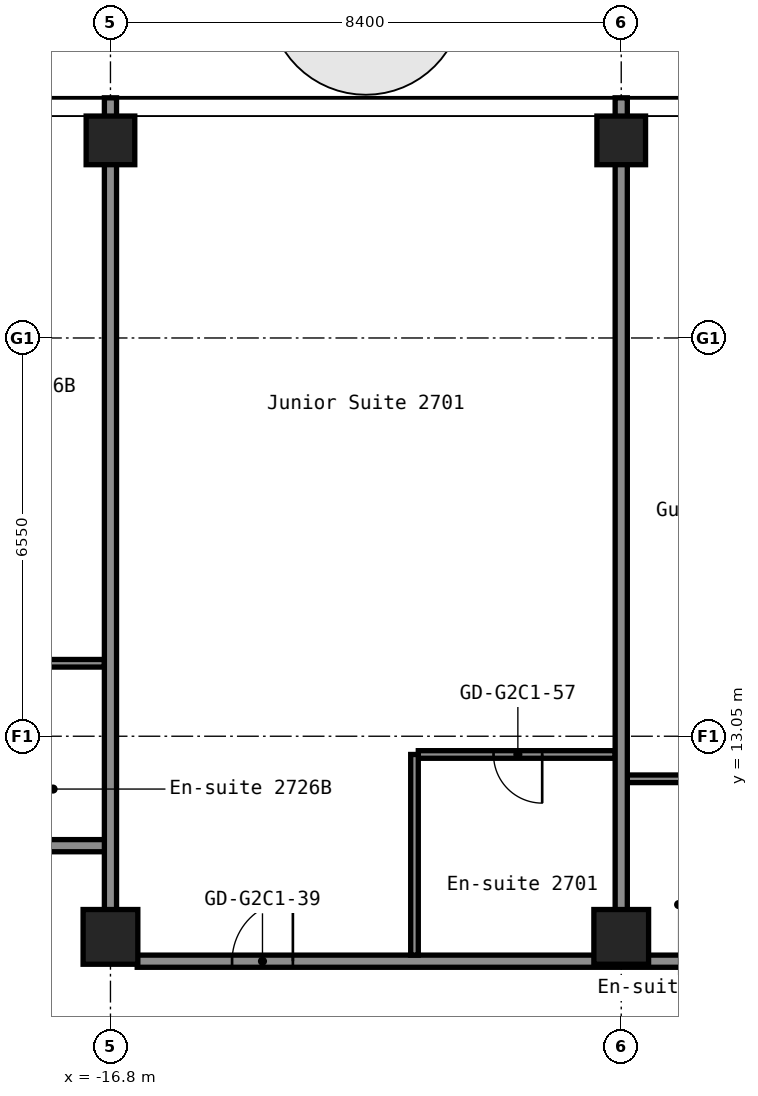
"""IFC4 building model, lengths in metres.
Left out: names, types, materials, properties, quantities, classifications, styles, units other than length and angle.
Written with IfcOpenShell. Run it as: python <this file> out.ifc"""

import sys

from ifc_helpers import new_model, si_unit, direction, frame, frame_2d, origin, origin_2d, place, context, subcontext, project, spatial, rectangle, hollow_rectangle, extrude, element, fill, save


model = new_model("IFC4")
c1 = context("Model", 3, precision=1e-05, world=origin(), true_north=direction((0.0, 1.0)))
c2 = subcontext(c1, "Body", "Model", "MODEL_VIEW")
j1 = project(units=[si_unit("LENGTHUNIT", "METRE"), si_unit("PLANEANGLEUNIT", "RADIAN")], contexts=[c1])
p1 = place(None, origin())
s1 = spatial("IfcSite", under=j1, at=p1, CompositionType="ELEMENT")
p2 = place(p1, origin())
s2 = spatial("IfcBuilding", under=s1, at=p2, CompositionType="ELEMENT")
p3 = place(p2, frame((0.0, 0.0, 97.8)))
s3 = spatial("IfcBuildingStorey", under=s2, at=p3, CompositionType="ELEMENT", Elevation=97.8)
p4 = place(p3, frame((-16.8, 9.75, 0.0), z_axis=(0.0, 0.0, 1.0), x_axis=(1.0, 0.0, 0.0)))
e1 = element("IfcColumn", 1, at=p4, inside=s3, PredefinedType="COLUMN", context=c2, shape_type="SweptSolid", body=[
    extrude(hollow_rectangle(XDim=0.9, YDim=0.9, WallThickness=0.036, at=origin_2d()), origin(), (0.0, 0.0, 1.0), 2.8),
])
p5 = place(p3, frame((-16.8, 22.85, 0.0), z_axis=(0.0, 0.0, 1.0), x_axis=(1.0, 0.0, 0.0)))
e2 = element("IfcColumn", 2, at=p5, inside=s3, PredefinedType="COLUMN", context=c2, shape_type="SweptSolid", body=[
    extrude(hollow_rectangle(XDim=0.8, YDim=0.8, WallThickness=0.032, at=origin_2d()), origin(), (0.0, 0.0, 1.0), 2.8),
])
p6 = place(p3, frame((-8.4, 9.75, 0.0), z_axis=(0.0, 0.0, 1.0), x_axis=(1.0, 0.0, 0.0)))
e3 = element("IfcColumn", 3, at=p6, inside=s3, PredefinedType="COLUMN", context=c2, shape_type="SweptSolid", body=[
    extrude(hollow_rectangle(XDim=0.9, YDim=0.9, WallThickness=0.036, at=origin_2d()), origin(), (0.0, 0.0, 1.0), 2.8),
])
p7 = place(p3, frame((-8.4, 22.85, 0.0), z_axis=(0.0, 0.0, 1.0), x_axis=(1.0, 0.0, 0.0)))
e4 = element("IfcColumn", 4, at=p7, inside=s3, PredefinedType="COLUMN", context=c2, shape_type="SweptSolid", body=[
    extrude(hollow_rectangle(XDim=0.8, YDim=0.8, WallThickness=0.032, at=origin_2d()), origin(), (0.0, 0.0, 1.0), 2.8),
])
p8 = place(p3, frame((-16.36, 9.35, 0.0), z_axis=(0.0, 0.0, 1.0), x_axis=(1.0, 0.0, 0.0)))
e5 = element("IfcWall", 5, at=p8, inside=s3, PredefinedType="PARTITIONING", context=c2, shape_type="SweptSolid", body=[
    extrude(rectangle(XDim=32.72, YDim=0.2, at=frame_2d((16.36, 0.0))), origin(), (0.0, 0.0, 1.0), 2.8),
])
p9 = place(p8, frame((1.56, 0.0, 0.0)))
e6 = element("IfcOpeningElement", 6, at=p9, cuts=e5, PredefinedType="OPENING", context=c2, shape_type="SweptSolid", body=[
    extrude(rectangle(XDim=1.0, YDim=2.1, at=frame_2d((0.5, 1.05))), frame((0.0, 0.11, 0.0), z_axis=(0.0, -1.0, 0.0), x_axis=(1.0, 0.0, 0.0)), (0.0, 0.0, 1.0), 0.22),
])
p10 = place(p8, frame((10.81, 0.0, 0.0)))
e7 = element("IfcOpeningElement", 7, at=p10, cuts=e5, PredefinedType="OPENING", context=c2, shape_type="SweptSolid", body=[
    extrude(rectangle(XDim=1.0, YDim=2.1, at=frame_2d((0.5, 1.05))), frame((0.0, 0.11, 0.0), z_axis=(0.0, -1.0, 0.0), x_axis=(1.0, 0.0, 0.0)), (0.0, 0.0, 1.0), 0.22),
])
p11 = place(p8, frame((12.51, 0.0, 0.0)))
e8 = element("IfcOpeningElement", 8, at=p11, cuts=e5, PredefinedType="OPENING", context=c2, shape_type="SweptSolid", body=[
    extrude(rectangle(XDim=1.0, YDim=2.1, at=frame_2d((0.5, 1.05))), frame((0.0, 0.11, 0.0), z_axis=(0.0, -1.0, 0.0), x_axis=(1.0, 0.0, 0.0)), (0.0, 0.0, 1.0), 0.22),
])
p12 = place(p8, frame((17.59, 0.0, 0.0)))
e9 = element("IfcOpeningElement", 9, at=p12, cuts=e5, PredefinedType="OPENING", context=c2, shape_type="SweptSolid", body=[
    extrude(rectangle(XDim=0.9, YDim=2.1, at=frame_2d((0.45, 1.05))), frame((0.0, 0.11, 0.0), z_axis=(0.0, -1.0, 0.0), x_axis=(1.0, 0.0, 0.0)), (0.0, 0.0, 1.0), 0.22),
])
p13 = place(p8, frame((21.79, 0.0, 0.0)))
e10 = element("IfcOpeningElement", 10, at=p13, cuts=e5, PredefinedType="OPENING", context=c2, shape_type="SweptSolid", body=[
    extrude(rectangle(XDim=0.9, YDim=2.1, at=frame_2d((0.45, 1.05))), frame((0.0, 0.11, 0.0), z_axis=(0.0, -1.0, 0.0), x_axis=(1.0, 0.0, 0.0)), (0.0, 0.0, 1.0), 0.22),
])
p14 = place(p8, frame((26.66, 0.0, 0.0)))
e11 = element("IfcOpeningElement", 11, at=p14, cuts=e5, PredefinedType="OPENING", context=c2, shape_type="SweptSolid", body=[
    extrude(rectangle(XDim=0.9, YDim=2.1, at=frame_2d((0.45, 1.05))), frame((0.0, 0.11, 0.0), z_axis=(0.0, -1.0, 0.0), x_axis=(1.0, 0.0, 0.0)), (0.0, 0.0, 1.0), 0.22),
])
p15 = place(p8, frame((30.86, 0.0, 0.0)))
e12 = element("IfcOpeningElement", 12, at=p15, cuts=e5, PredefinedType="OPENING", context=c2, shape_type="SweptSolid", body=[
    extrude(rectangle(XDim=0.9, YDim=2.1, at=frame_2d((0.45, 1.05))), frame((0.0, 0.11, 0.0), z_axis=(0.0, -1.0, 0.0), x_axis=(1.0, 0.0, 0.0)), (0.0, 0.0, 1.0), 0.22),
])
p16 = place(p3, frame((-46.5, 11.25, 0.0), z_axis=(0.0, 0.0, 1.0), x_axis=(1.0, 0.0, 0.0)))
e13 = element("IfcWall", 13, at=p16, inside=s3, PredefinedType="PARTITIONING", context=c2, shape_type="SweptSolid", body=[
    extrude(rectangle(XDim=29.7, YDim=0.2, at=frame_2d((14.85, 0.0))), origin(), (0.0, 0.0, 1.0), 2.8),
])
p17 = place(p16, frame((1.95, 0.0, 0.0)))
e14 = element("IfcOpeningElement", 14, at=p17, cuts=e13, PredefinedType="OPENING", context=c2, shape_type="SweptSolid", body=[
    extrude(rectangle(XDim=0.9, YDim=2.1, at=frame_2d((0.45, 1.05))), frame((0.0, 0.11, 0.0), z_axis=(0.0, -1.0, 0.0), x_axis=(1.0, 0.0, 0.0)), (0.0, 0.0, 1.0), 0.22),
])
p18 = place(p16, frame((7.35, 0.0, 0.0)))
e15 = element("IfcOpeningElement", 15, at=p18, cuts=e13, PredefinedType="OPENING", context=c2, shape_type="SweptSolid", body=[
    extrude(rectangle(XDim=1.0, YDim=2.1, at=frame_2d((0.5, 1.05))), frame((0.0, 0.11, 0.0), z_axis=(0.0, -1.0, 0.0), x_axis=(1.0, 0.0, 0.0)), (0.0, 0.0, 1.0), 0.22),
])
p19 = place(p16, frame((9.05, 0.0, 0.0)))
e16 = element("IfcOpeningElement", 16, at=p19, cuts=e13, PredefinedType="OPENING", context=c2, shape_type="SweptSolid", body=[
    extrude(rectangle(XDim=1.0, YDim=2.1, at=frame_2d((0.5, 1.05))), frame((0.0, 0.11, 0.0), z_axis=(0.0, -1.0, 0.0), x_axis=(1.0, 0.0, 0.0)), (0.0, 0.0, 1.0), 0.22),
])
p20 = place(p16, frame((14.9, 0.0, 0.0)))
e17 = element("IfcOpeningElement", 17, at=p20, cuts=e13, PredefinedType="OPENING", context=c2, shape_type="SweptSolid", body=[
    extrude(rectangle(XDim=1.0, YDim=2.1, at=frame_2d((0.5, 1.05))), frame((0.0, 0.11, 0.0), z_axis=(0.0, -1.0, 0.0), x_axis=(1.0, 0.0, 0.0)), (0.0, 0.0, 1.0), 0.22),
])
p21 = place(p16, frame((24.15, 0.0, 0.0)))
e18 = element("IfcOpeningElement", 18, at=p21, cuts=e13, PredefinedType="OPENING", context=c2, shape_type="SweptSolid", body=[
    extrude(rectangle(XDim=1.0, YDim=2.1, at=frame_2d((0.5, 1.05))), frame((0.0, 0.11, 0.0), z_axis=(0.0, -1.0, 0.0), x_axis=(1.0, 0.0, 0.0)), (0.0, 0.0, 1.0), 0.22),
])
p22 = place(p16, frame((25.85, 0.0, 0.0)))
e19 = element("IfcOpeningElement", 19, at=p22, cuts=e13, PredefinedType="OPENING", context=c2, shape_type="SweptSolid", body=[
    extrude(rectangle(XDim=1.0, YDim=2.1, at=frame_2d((0.5, 1.05))), frame((0.0, 0.11, 0.0), z_axis=(0.0, -1.0, 0.0), x_axis=(1.0, 0.0, 0.0)), (0.0, 0.0, 1.0), 0.22),
])
p23 = place(p3, frame((-8.3, 12.35, 0.0), z_axis=(0.0, 0.0, 1.0), x_axis=(1.0, 0.0, 0.0)))
e20 = element("IfcWall", 20, at=p23, inside=s3, PredefinedType="PARTITIONING", context=c2, shape_type="SweptSolid", body=[
    extrude(rectangle(XDim=2.338, YDim=0.125, at=frame_2d((1.169, 0.0))), origin(), (0.0, 0.0, 1.0), 2.8),
])
p24 = place(p3, frame((-11.738, 12.75, 0.0), z_axis=(0.0, 0.0, 1.0), x_axis=(1.0, 0.0, 0.0)))
e21 = element("IfcWall", 21, at=p24, inside=s3, PredefinedType="PARTITIONING", context=c2, shape_type="SweptSolid", body=[
    extrude(rectangle(XDim=3.238, YDim=0.125, at=frame_2d((1.619, 0.0))), origin(), (0.0, 0.0, 1.0), 2.8),
])
p25 = place(p24, frame((1.238, 0.0, 0.0)))
e22 = element("IfcOpeningElement", 22, at=p25, cuts=e21, PredefinedType="OPENING", context=c2, shape_type="SweptSolid", body=[
    extrude(rectangle(XDim=0.8, YDim=2.1, at=frame_2d((0.4, 1.05))), frame((0.0, 0.073, 0.0), z_axis=(0.0, -1.0, 0.0), x_axis=(1.0, 0.0, 0.0)), (0.0, 0.0, 1.0), 0.145),
])
p26 = place(p3, frame((-19.238, 14.25, 0.0), z_axis=(0.0, 0.0, 1.0), x_axis=(1.0, 0.0, 0.0)))
e23 = element("IfcWall", 23, at=p26, inside=s3, PredefinedType="PARTITIONING", context=c2, shape_type="SweptSolid", body=[
    extrude(rectangle(XDim=2.338, YDim=0.125, at=frame_2d((1.169, 0.0))), origin(), (0.0, 0.0, 1.0), 2.8),
])
p27 = place(p3, frame((-16.8, 10.19, 0.0), z_axis=(0.0, 0.0, 1.0), x_axis=(0.0, 1.0, 0.0)))
e24 = element("IfcWall", 24, at=p27, inside=s3, PredefinedType="PARTITIONING", context=c2, shape_type="SweptSolid", body=[
    extrude(rectangle(XDim=13.36, YDim=0.2, at=frame_2d((6.68, 0.0))), origin(), (0.0, 0.0, 1.0), 2.8),
])
p28 = place(p3, frame((-11.8, 9.45, 0.0), z_axis=(0.0, 0.0, 1.0), x_axis=(0.0, 1.0, 0.0)))
e25 = element("IfcWall", 25, at=p28, inside=s3, PredefinedType="PARTITIONING", context=c2, shape_type="SweptSolid", body=[
    extrude(rectangle(XDim=3.3, YDim=0.125, at=frame_2d((1.65, 0.0))), origin(), (0.0, 0.0, 1.0), 2.8),
])
p29 = place(p3, frame((-8.4, 10.19, 0.0), z_axis=(0.0, 0.0, 1.0), x_axis=(0.0, 1.0, 0.0)))
e26 = element("IfcWall", 26, at=p29, inside=s3, PredefinedType="PARTITIONING", context=c2, shape_type="SweptSolid", body=[
    extrude(rectangle(XDim=13.36, YDim=0.2, at=frame_2d((6.68, 0.0))), origin(), (0.0, 0.0, 1.0), 2.8),
])
p30 = place(p9, origin())
e27 = element("IfcDoor", 27, at=p30, inside=s3, OperationType="SINGLE_SWING_LEFT", PredefinedType="DOOR", context=c2, shape_type="SweptSolid", body=[
    extrude(rectangle(XDim=1.0, YDim=2.1, at=frame_2d((0.5, 1.05))), frame((0.0, 0.025, 0.0), z_axis=(0.0, -1.0, 0.0), x_axis=(1.0, 0.0, 0.0)), (0.0, 0.0, 1.0), 0.05),
])
fill(e6, e27)
p31 = place(p25, origin())
e28 = element("IfcDoor", 28, at=p31, inside=s3, OperationType="SINGLE_SWING_RIGHT", PredefinedType="DOOR", context=c2, shape_type="SweptSolid", body=[
    extrude(rectangle(XDim=0.8, YDim=2.1, at=frame_2d((0.4, 1.05))), frame((0.0, 0.025, 0.0), z_axis=(0.0, -1.0, 0.0), x_axis=(1.0, 0.0, 0.0)), (0.0, 0.0, 1.0), 0.05),
])
fill(e22, e28)
save(model, sys.argv[1])
